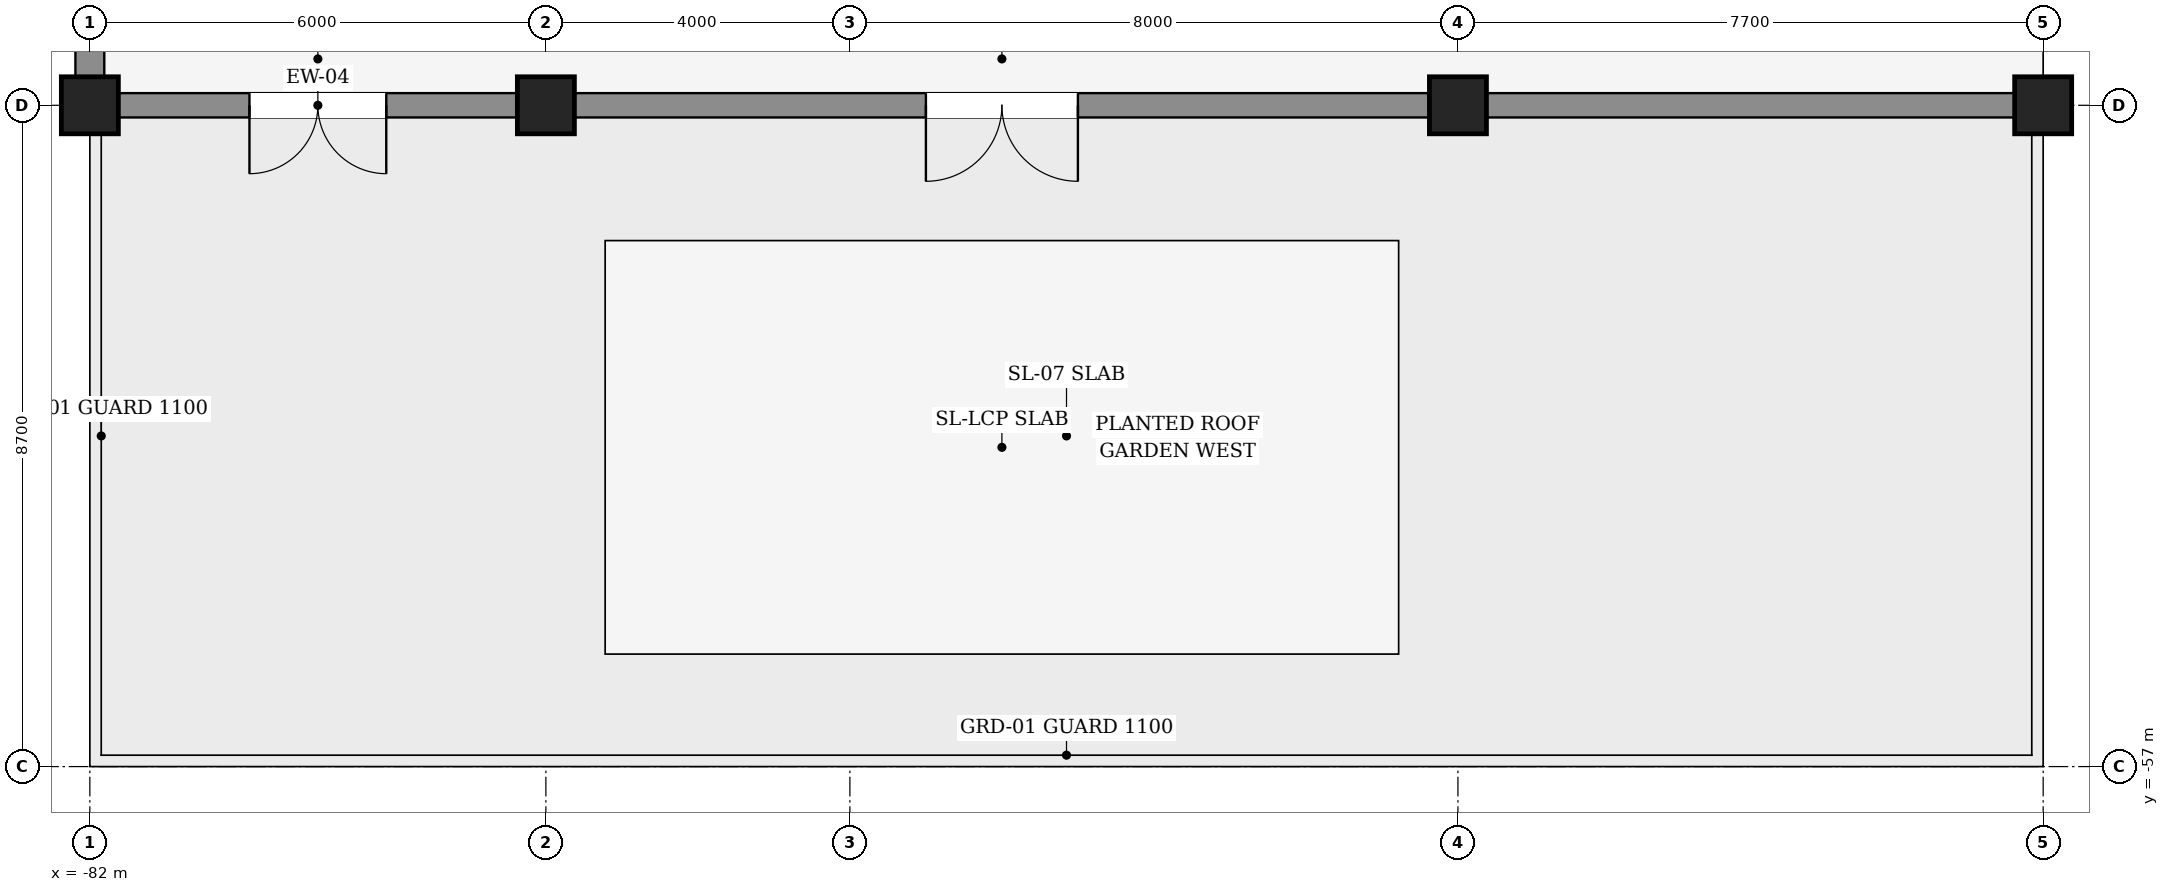
"""IFC4 building model, lengths in metres.
Left out: names, types, materials, properties, quantities, classifications, styles, units other than length and angle.
Written with IfcOpenShell. Run it as: python <this file> out.ifc"""

import sys

from ifc_helpers import new_model, si_unit, direction, frame, frame_2d, origin, origin_2d, place, context, subcontext, project, spatial, rectangle, extrude, element, fill, save


model = new_model("IFC4")
c1 = context("Model", 3, precision=1e-05, world=origin(), true_north=direction((0.0, 1.0)))
c2 = subcontext(c1, "Body", "Model", "MODEL_VIEW")
j1 = project(units=[si_unit("LENGTHUNIT", "METRE"), si_unit("PLANEANGLEUNIT", "RADIAN")], contexts=[c1])
p1 = place(None, origin())
s1 = spatial("IfcSite", under=j1, at=p1, CompositionType="ELEMENT")
p2 = place(p1, origin())
s2 = spatial("IfcBuilding", under=s1, at=p2, CompositionType="ELEMENT")
p3 = place(p2, frame((0.0, 0.0, 21.0)))
s3 = spatial("IfcBuildingStorey", under=s2, at=p3, CompositionType="ELEMENT", Elevation=21.0)
for number, where, z_axis, x_axis in (
    (1, (-82.0, -48.3, 0.0), (0.0, 0.0, 1.0), (1.0, 0.0, 0.0)),
    (2, (-76.0, -48.3, 0.0), (0.0, 0.0, 1.0), (1.0, 0.0, 0.0)),
    (3, (-64.0, -48.3, 0.0), (0.0, 0.0, 1.0), (1.0, 0.0, 0.0)),
    (4, (-56.3, -48.3, 0.0), (0.0, 0.0, 1.0), (1.0, 0.0, 0.0)),
):
    element("IfcColumn", number, at=place(p3, frame(where, z_axis=z_axis, x_axis=x_axis)), inside=s3, PredefinedType="COLUMN", context=c2, shape_type="SweptSolid", body=[
        extrude(rectangle(XDim=0.75, YDim=0.75, at=origin_2d()), origin(), (0.0, 0.0, 1.0), 5.4),
    ])
p4 = place(p3, frame((-82.0, -47.943, 0.0), z_axis=(0.0, 0.0, 1.0), x_axis=(0.0, 1.0, 0.0)))
e5 = element("IfcWall", 5, at=p4, inside=s3, PredefinedType="SOLIDWALL", context=c2, shape_type="SweptSolid", body=[
    extrude(rectangle(XDim=13.586, YDim=0.38, at=frame_2d((6.793, 0.0))), origin(), (0.0, 0.0, 1.0), 4.36),
])
p5 = place(p4, frame((5.418, 0.0, 0.9)))
e6 = element("IfcOpeningElement", 6, at=p5, cuts=e5, PredefinedType="OPENING", context=c2, shape_type="SweptSolid", body=[
    extrude(rectangle(XDim=2.75, YDim=2.0, at=frame_2d((1.375, 1.0))), frame((0.0, 0.2, 0.0), z_axis=(0.0, -1.0, 0.0), x_axis=(1.0, 0.0, 0.0)), (0.0, 0.0, 1.0), 0.4),
])
p6 = place(p3, frame((-76.357, -48.3, 0.0), z_axis=(0.0, 0.0, 1.0), x_axis=(-1.0, 0.0, 0.0)))
e7 = element("IfcWall", 7, at=p6, inside=s3, PredefinedType="SOLIDWALL", context=c2, shape_type="SweptSolid", body=[
    extrude(rectangle(XDim=5.286, YDim=0.32, at=frame_2d((2.643, 0.0))), origin(), (0.0, 0.0, 1.0), 4.36),
])
p7 = place(p6, frame((1.743, 0.0, 0.0)))
e8 = element("IfcOpeningElement", 8, at=p7, cuts=e7, PredefinedType="OPENING", context=c2, shape_type="SweptSolid", body=[
    extrude(rectangle(XDim=1.8, YDim=2.4, at=frame_2d((0.9, 1.2))), frame((0.0, 0.17, 0.0), z_axis=(0.0, -1.0, 0.0), x_axis=(1.0, 0.0, 0.0)), (0.0, 0.0, 1.0), 0.34),
])
p8 = place(p3, frame((-64.357, -48.3, 0.0), z_axis=(0.0, 0.0, 1.0), x_axis=(-1.0, 0.0, 0.0)))
e9 = element("IfcWall", 9, at=p8, inside=s3, PredefinedType="SOLIDWALL", context=c2, shape_type="SweptSolid", body=[
    extrude(rectangle(XDim=11.286, YDim=0.32, at=frame_2d((5.643, 0.0))), origin(), (0.0, 0.0, 1.0), 4.16),
])
p9 = place(p8, frame((4.643, 0.0, 0.0)))
e10 = element("IfcOpeningElement", 10, at=p9, cuts=e9, PredefinedType="OPENING", context=c2, shape_type="SweptSolid", body=[
    extrude(rectangle(XDim=2.0, YDim=2.4, at=frame_2d((1.0, 1.2))), frame((0.0, 0.17, 0.0), z_axis=(0.0, -1.0, 0.0), x_axis=(1.0, 0.0, 0.0)), (0.0, 0.0, 1.0), 0.34),
])
p10 = place(p3, frame((-56.657, -48.3, 0.0), z_axis=(0.0, 0.0, 1.0), x_axis=(-1.0, 0.0, 0.0)))
e11 = element("IfcWall", 11, at=p10, inside=s3, PredefinedType="SOLIDWALL", context=c2, shape_type="SweptSolid", body=[
    extrude(rectangle(XDim=6.986, YDim=0.32, at=frame_2d((3.493, 0.0))), origin(), (0.0, 0.0, 1.0), 4.36),
])
p11 = place(p7, origin())
e12 = element("IfcDoor", 12, at=p11, inside=s3, OperationType="DOUBLE_DOOR_SINGLE_SWING", PredefinedType="DOOR", context=c2, shape_type="SweptSolid", body=[
    extrude(rectangle(XDim=1.8, YDim=2.4, at=frame_2d((0.9, 1.2))), frame((0.0, 0.025, 0.0), z_axis=(0.0, -1.0, 0.0), x_axis=(1.0, 0.0, 0.0)), (0.0, 0.0, 1.0), 0.05),
])
fill(e8, e12)
p12 = place(p9, origin())
e13 = element("IfcDoor", 13, at=p12, inside=s3, OperationType="DOUBLE_DOOR_SINGLE_SWING", PredefinedType="DOOR", context=c2, shape_type="SweptSolid", body=[
    extrude(rectangle(XDim=2.0, YDim=2.4, at=frame_2d((1.0, 1.2))), frame((0.0, 0.025, 0.0), z_axis=(0.0, -1.0, 0.0), x_axis=(1.0, 0.0, 0.0)), (0.0, 0.0, 1.0), 0.05),
])
fill(e10, e13)
save(model, sys.argv[1])
